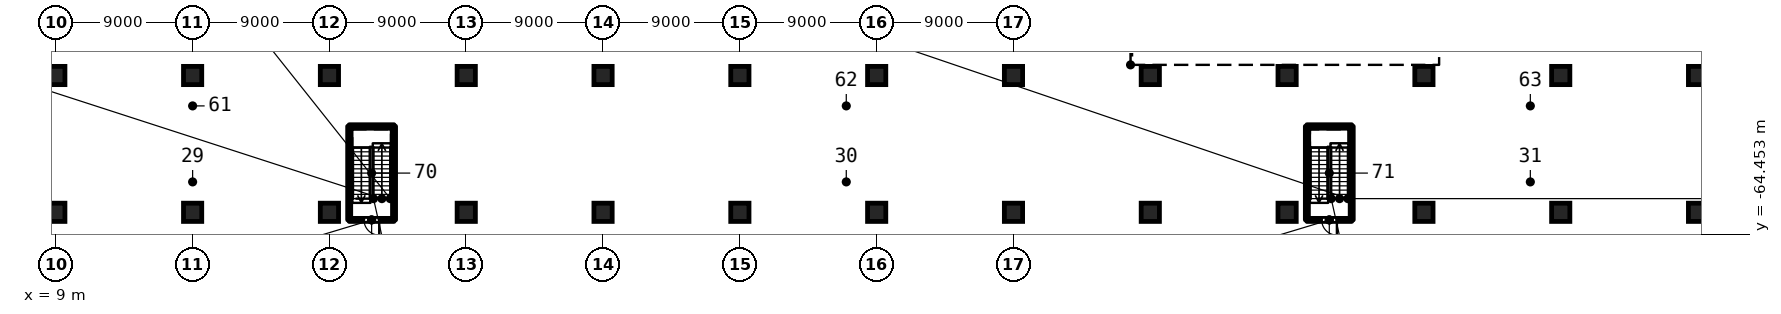
"""IFC4 building model, lengths in metres.
Left out: names, types, materials, properties, quantities, classifications, styles, units other than length and angle.
Written with IfcOpenShell. Run it as: python <this file> out.ifc"""

import sys

from ifc_helpers import new_model, si_unit, direction, frame, frame_2d, origin, origin_2d, place, context, subcontext, project, spatial, rectangle, extrude, element, fill, save


model = new_model("IFC4")
c1 = context("Model", 3, precision=1e-05, world=origin(), true_north=direction((0.0, 1.0)))
c2 = subcontext(c1, "Body", "Model", "MODEL_VIEW")
j1 = project(units=[si_unit("LENGTHUNIT", "METRE"), si_unit("PLANEANGLEUNIT", "RADIAN")], contexts=[c1])
p1 = place(None, origin())
s1 = spatial("IfcSite", under=j1, at=p1, CompositionType="ELEMENT")
p2 = place(p1, origin())
s2 = spatial("IfcBuilding", under=s1, at=p2, CompositionType="ELEMENT")
p3 = place(p2, frame((0.0, 0.0, -4.5)))
s3 = spatial("IfcBuildingStorey", under=s2, at=p3, CompositionType="ELEMENT", Elevation=-4.5)
for number, where, z_axis, x_axis in (
    (1, (9.0, -63.0, 0.0), (0.0, 0.0, 1.0), (1.0, 0.0, 0.0)),
    (2, (9.0, -54.0, 0.0), (0.0, 0.0, 1.0), (1.0, 0.0, 0.0)),
    (3, (18.0, -63.0, 0.0), (0.0, 0.0, 1.0), (1.0, 0.0, 0.0)),
    (4, (18.0, -54.0, 0.0), (0.0, 0.0, 1.0), (1.0, 0.0, 0.0)),
    (5, (27.0, -63.0, 0.0), (0.0, 0.0, 1.0), (1.0, 0.0, 0.0)),
    (6, (27.0, -54.0, 0.0), (0.0, 0.0, 1.0), (1.0, 0.0, 0.0)),
    (7, (36.0, -63.0, 0.0), (0.0, 0.0, 1.0), (1.0, 0.0, 0.0)),
    (8, (36.0, -54.0, 0.0), (0.0, 0.0, 1.0), (1.0, 0.0, 0.0)),
    (9, (45.0, -63.0, 0.0), (0.0, 0.0, 1.0), (1.0, 0.0, 0.0)),
    (10, (45.0, -54.0, 0.0), (0.0, 0.0, 1.0), (1.0, 0.0, 0.0)),
    (11, (54.0, -63.0, 0.0), (0.0, 0.0, 1.0), (1.0, 0.0, 0.0)),
    (12, (54.0, -54.0, 0.0), (0.0, 0.0, 1.0), (1.0, 0.0, 0.0)),
    (13, (63.0, -63.0, 0.0), (0.0, 0.0, 1.0), (1.0, 0.0, 0.0)),
    (14, (63.0, -54.0, 0.0), (0.0, 0.0, 1.0), (1.0, 0.0, 0.0)),
    (15, (72.0, -63.0, 0.0), (0.0, 0.0, 1.0), (1.0, 0.0, 0.0)),
    (16, (72.0, -54.0, 0.0), (0.0, 0.0, 1.0), (1.0, 0.0, 0.0)),
    (17, (81.0, -63.0, 0.0), (0.0, 0.0, 1.0), (1.0, 0.0, 0.0)),
    (18, (81.0, -54.0, 0.0), (0.0, 0.0, 1.0), (1.0, 0.0, 0.0)),
    (19, (90.0, -63.0, 0.0), (0.0, 0.0, 1.0), (1.0, 0.0, 0.0)),
    (20, (90.0, -54.0, 0.0), (0.0, 0.0, 1.0), (1.0, 0.0, 0.0)),
    (21, (99.0, -63.0, 0.0), (0.0, 0.0, 1.0), (1.0, 0.0, 0.0)),
    (22, (99.0, -54.0, 0.0), (0.0, 0.0, 1.0), (1.0, 0.0, 0.0)),
    (23, (108.0, -63.0, 0.0), (0.0, 0.0, 1.0), (1.0, 0.0, 0.0)),
    (24, (108.0, -54.0, 0.0), (0.0, 0.0, 1.0), (1.0, 0.0, 0.0)),
    (25, (117.0, -63.0, 0.0), (0.0, 0.0, 1.0), (1.0, 0.0, 0.0)),
    (26, (117.0, -54.0, 0.0), (0.0, 0.0, 1.0), (1.0, 0.0, 0.0)),
):
    element("IfcColumn", number, at=place(p3, frame(where, z_axis=z_axis, x_axis=x_axis)), inside=s3, PredefinedType="COLUMN", context=c2, shape_type="SweptSolid", body=[
        extrude(rectangle(XDim=1.2, YDim=1.2, at=origin_2d()), origin(), (0.0, 0.0, 1.0), 4.5),
    ])
p4 = place(p3, frame((31.25, -63.5, 0.0), z_axis=(0.0, 0.0, 1.0), x_axis=(-1.0, 0.0, 0.0)))
e27 = element("IfcWall", 27, at=p4, inside=s3, PredefinedType="SOLIDWALL", context=c2, shape_type="SweptSolid", body=[
    extrude(rectangle(XDim=2.95, YDim=0.2, at=frame_2d((1.475, 0.0))), origin(), (0.0, 0.0, 1.0), 4.05),
])
p5 = place(p4, frame((0.975, 0.0, 0.0)))
e28 = element("IfcOpeningElement", 28, at=p5, cuts=e27, PredefinedType="OPENING", context=c2, shape_type="SweptSolid", body=[
    extrude(rectangle(XDim=1.0, YDim=2.1, at=frame_2d((0.5, 1.05))), frame((0.0, 0.11, 0.0), z_axis=(0.0, -1.0, 0.0), x_axis=(1.0, 0.0, 0.0)), (0.0, 0.0, 1.0), 0.22),
])
p6 = place(p3, frame((28.3, -63.5, 0.0), z_axis=(0.0, 0.0, 1.0), x_axis=(0.0, 1.0, 0.0)))
e29 = element("IfcWall", 29, at=p6, inside=s3, PredefinedType="SOLIDWALL", context=c2, shape_type="SweptSolid", body=[
    extrude(rectangle(XDim=6.16, YDim=0.2, at=frame_2d((3.08, 0.0))), origin(), (0.0, 0.0, 1.0), 4.05),
])
p7 = place(p3, frame((28.3, -57.34, 0.0), z_axis=(0.0, 0.0, 1.0), x_axis=(1.0, 0.0, 0.0)))
e30 = element("IfcWall", 30, at=p7, inside=s3, PredefinedType="SOLIDWALL", context=c2, shape_type="SweptSolid", body=[
    extrude(rectangle(XDim=2.95, YDim=0.2, at=frame_2d((1.475, 0.0))), origin(), (0.0, 0.0, 1.0), 4.05),
])
p8 = place(p3, frame((31.25, -57.34, 0.0), z_axis=(0.0, 0.0, 1.0), x_axis=(0.0, -1.0, 0.0)))
e31 = element("IfcWall", 31, at=p8, inside=s3, PredefinedType="SOLIDWALL", context=c2, shape_type="SweptSolid", body=[
    extrude(rectangle(XDim=6.16, YDim=0.2, at=frame_2d((3.08, 0.0))), origin(), (0.0, 0.0, 1.0), 4.05),
])
p9 = place(p3, frame((94.25, -63.5, 0.0), z_axis=(0.0, 0.0, 1.0), x_axis=(-1.0, 0.0, 0.0)))
e32 = element("IfcWall", 32, at=p9, inside=s3, PredefinedType="SOLIDWALL", context=c2, shape_type="SweptSolid", body=[
    extrude(rectangle(XDim=2.95, YDim=0.2, at=frame_2d((1.475, 0.0))), origin(), (0.0, 0.0, 1.0), 4.05),
])
p10 = place(p9, frame((0.975, 0.0, 0.0)))
e33 = element("IfcOpeningElement", 33, at=p10, cuts=e32, PredefinedType="OPENING", context=c2, shape_type="SweptSolid", body=[
    extrude(rectangle(XDim=1.0, YDim=2.1, at=frame_2d((0.5, 1.05))), frame((0.0, 0.11, 0.0), z_axis=(0.0, -1.0, 0.0), x_axis=(1.0, 0.0, 0.0)), (0.0, 0.0, 1.0), 0.22),
])
p11 = place(p3, frame((91.3, -63.5, 0.0), z_axis=(0.0, 0.0, 1.0), x_axis=(0.0, 1.0, 0.0)))
e34 = element("IfcWall", 34, at=p11, inside=s3, PredefinedType="SOLIDWALL", context=c2, shape_type="SweptSolid", body=[
    extrude(rectangle(XDim=6.16, YDim=0.2, at=frame_2d((3.08, 0.0))), origin(), (0.0, 0.0, 1.0), 4.05),
])
p12 = place(p3, frame((91.3, -57.34, 0.0), z_axis=(0.0, 0.0, 1.0), x_axis=(1.0, 0.0, 0.0)))
e35 = element("IfcWall", 35, at=p12, inside=s3, PredefinedType="SOLIDWALL", context=c2, shape_type="SweptSolid", body=[
    extrude(rectangle(XDim=2.95, YDim=0.2, at=frame_2d((1.475, 0.0))), origin(), (0.0, 0.0, 1.0), 4.05),
])
p13 = place(p3, frame((94.25, -57.34, 0.0), z_axis=(0.0, 0.0, 1.0), x_axis=(0.0, -1.0, 0.0)))
e36 = element("IfcWall", 36, at=p13, inside=s3, PredefinedType="SOLIDWALL", context=c2, shape_type="SweptSolid", body=[
    extrude(rectangle(XDim=6.16, YDim=0.2, at=frame_2d((3.08, 0.0))), origin(), (0.0, 0.0, 1.0), 4.05),
])
p14 = place(p5, origin())
e37 = element("IfcDoor", 37, at=p14, inside=s3, OperationType="SINGLE_SWING_LEFT", PredefinedType="DOOR", context=c2, shape_type="SweptSolid", body=[
    extrude(rectangle(XDim=1.0, YDim=2.1, at=frame_2d((0.5, 1.05))), frame((0.0, 0.025, 0.0), z_axis=(0.0, -1.0, 0.0), x_axis=(1.0, 0.0, 0.0)), (0.0, 0.0, 1.0), 0.05),
])
fill(e28, e37)
p15 = place(p10, origin())
e38 = element("IfcDoor", 38, at=p15, inside=s3, OperationType="SINGLE_SWING_LEFT", PredefinedType="DOOR", context=c2, shape_type="SweptSolid", body=[
    extrude(rectangle(XDim=1.0, YDim=2.1, at=frame_2d((0.5, 1.05))), frame((0.0, 0.025, 0.0), z_axis=(0.0, -1.0, 0.0), x_axis=(1.0, 0.0, 0.0)), (0.0, 0.0, 1.0), 0.05),
])
fill(e33, e38)
save(model, sys.argv[1])
